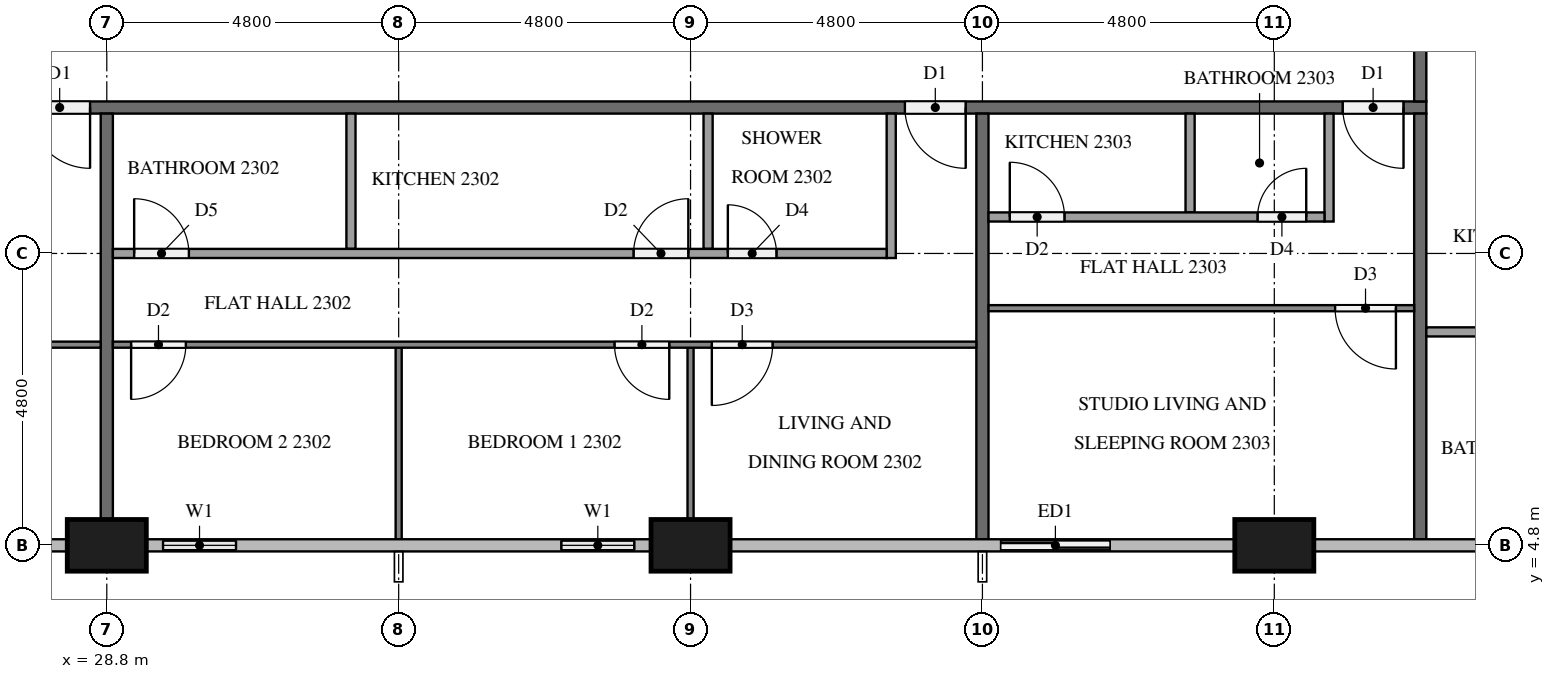
"""IFC4 building model, lengths in metres.
Left out: names, types, materials, properties, quantities, classifications, styles, units other than length and angle.
Written with IfcOpenShell. Run it as: python <this file> out.ifc"""

import sys

from ifc_helpers import new_model, si_unit, direction, frame, frame_2d, origin, origin_2d, place, context, subcontext, project, spatial, rectangle, extrude, element, fill, save


model = new_model("IFC4")
c1 = context("Model", 3, precision=1e-05, world=origin(), true_north=direction((0.0, 1.0)))
c2 = subcontext(c1, "Body", "Model", "MODEL_VIEW")
j1 = project(units=[si_unit("LENGTHUNIT", "METRE"), si_unit("PLANEANGLEUNIT", "RADIAN")], contexts=[c1])
p1 = place(None, origin())
s1 = spatial("IfcSite", under=j1, at=p1, CompositionType="ELEMENT")
p2 = place(p1, origin())
s2 = spatial("IfcBuilding", under=s1, at=p2, CompositionType="ELEMENT")
p3 = place(p2, frame((0.0, 0.0, 92.7)))
s3 = spatial("IfcBuildingStorey", under=s2, at=p3, CompositionType="ELEMENT", Elevation=92.7)
for number, where, z_axis, x_axis in (
    (1, (28.8, 4.8, 0.0), (0.0, 0.0, 1.0), (1.0, 0.0, 0.0)),
    (2, (38.4, 4.8, 0.0), (0.0, 0.0, 1.0), (1.0, 0.0, 0.0)),
    (3, (48.0, 4.8, 0.0), (0.0, 0.0, 1.0), (1.0, 0.0, 0.0)),
):
    element("IfcColumn", number, at=place(p3, frame(where, z_axis=z_axis, x_axis=x_axis)), inside=s3, PredefinedType="COLUMN", context=c2, shape_type="SweptSolid", body=[
        extrude(rectangle(XDim=1.3, YDim=0.85, at=origin_2d()), origin(), (0.0, 0.0, 1.0), 3.2),
    ])
p4 = place(p3, frame((26.4, 4.8, 0.0), z_axis=(0.0, 0.0, 1.0), x_axis=(1.0, 0.0, 0.0)))
e4 = element("IfcWall", 4, at=p4, inside=s3, PredefinedType="SOLIDWALL", context=c2, shape_type="SweptSolid", body=[
    extrude(rectangle(XDim=1.75, YDim=0.15, at=frame_2d((0.875, 0.0))), origin(), (0.0, 0.0, 1.0), 3.2),
])
p5 = place(p4, frame((0.275, 0.0, 0.9)))
e5 = element("IfcOpeningElement", 5, at=p5, cuts=e4, PredefinedType="OPENING", context=c2, shape_type="SweptSolid", body=[
    extrude(rectangle(XDim=1.2, YDim=1.4, at=frame_2d((0.6, 0.7))), frame((0.0, 0.085, 0.0), z_axis=(0.0, -1.0, 0.0), x_axis=(1.0, 0.0, 0.0)), (0.0, 0.0, 1.0), 0.17),
])
p6 = place(p3, frame((29.45, 4.8, 0.0), z_axis=(0.0, 0.0, 1.0), x_axis=(1.0, 0.0, 0.0)))
e6 = element("IfcWall", 6, at=p6, inside=s3, PredefinedType="SOLIDWALL", context=c2, shape_type="SweptSolid", body=[
    extrude(rectangle(XDim=1.75, YDim=0.15, at=frame_2d((0.875, 0.0))), origin(), (0.0, 0.0, 1.0), 3.2),
])
p7 = place(p6, frame((0.275, 0.0, 0.9)))
e7 = element("IfcOpeningElement", 7, at=p7, cuts=e6, PredefinedType="OPENING", context=c2, shape_type="SweptSolid", body=[
    extrude(rectangle(XDim=1.2, YDim=1.4, at=frame_2d((0.6, 0.7))), frame((0.0, 0.085, 0.0), z_axis=(0.0, -1.0, 0.0), x_axis=(1.0, 0.0, 0.0)), (0.0, 0.0, 1.0), 0.17),
])
p8 = place(p3, frame((36.0, 4.8, 0.0), z_axis=(0.0, 0.0, 1.0), x_axis=(1.0, 0.0, 0.0)))
e8 = element("IfcWall", 8, at=p8, inside=s3, PredefinedType="SOLIDWALL", context=c2, shape_type="SweptSolid", body=[
    extrude(rectangle(XDim=1.75, YDim=0.15, at=frame_2d((0.875, 0.0))), origin(), (0.0, 0.0, 1.0), 3.2),
])
p9 = place(p8, frame((0.275, 0.0, 0.9)))
e9 = element("IfcOpeningElement", 9, at=p9, cuts=e8, PredefinedType="OPENING", context=c2, shape_type="SweptSolid", body=[
    extrude(rectangle(XDim=1.2, YDim=1.4, at=frame_2d((0.6, 0.7))), frame((0.0, 0.085, 0.0), z_axis=(0.0, -1.0, 0.0), x_axis=(1.0, 0.0, 0.0)), (0.0, 0.0, 1.0), 0.17),
])
p10 = place(p3, frame((43.2, 4.8, 0.0), z_axis=(0.0, 0.0, 1.0), x_axis=(1.0, 0.0, 0.0)))
e10 = element("IfcWall", 10, at=p10, inside=s3, PredefinedType="SOLIDWALL", context=c2, shape_type="SweptSolid", body=[
    extrude(rectangle(XDim=2.4, YDim=0.15, at=frame_2d((1.2, 0.0))), origin(), (0.0, 0.0, 1.0), 3.2),
])
p11 = place(p10, frame((0.3, 0.0, 0.0)))
e11 = element("IfcOpeningElement", 11, at=p11, cuts=e10, PredefinedType="OPENING", context=c2, shape_type="SweptSolid", body=[
    extrude(rectangle(XDim=1.8, YDim=2.4, at=frame_2d((0.9, 1.2))), frame((0.0, 0.085, 0.0), z_axis=(0.0, -1.0, 0.0), x_axis=(1.0, 0.0, 0.0)), (0.0, 0.0, 1.0), 0.17),
])
p12 = place(p3, frame((50.5, 12.0, 0.0), z_axis=(0.0, 0.0, 1.0), x_axis=(-1.0, 0.0, 0.0)))
e12 = element("IfcWall", 12, at=p12, inside=s3, PredefinedType="PARTITIONING", context=c2, shape_type="SweptSolid", body=[
    extrude(rectangle(XDim=38.6, YDim=0.2, at=frame_2d((19.3, 0.0))), origin(), (0.0, 0.0, 1.0), 3.2),
])
p13 = place(p12, frame((21.975, 0.0, 0.0)))
e13 = element("IfcOpeningElement", 13, at=p13, cuts=e12, PredefinedType="OPENING", context=c2, shape_type="SweptSolid", body=[
    extrude(rectangle(XDim=1.0, YDim=2.1, at=frame_2d((0.5, 1.05))), frame((0.0, 0.11, 0.0), z_axis=(0.0, -1.0, 0.0), x_axis=(1.0, 0.0, 0.0)), (0.0, 0.0, 1.0), 0.22),
])
p14 = place(p12, frame((7.575, 0.0, 0.0)))
e14 = element("IfcOpeningElement", 14, at=p14, cuts=e12, PredefinedType="OPENING", context=c2, shape_type="SweptSolid", body=[
    extrude(rectangle(XDim=1.0, YDim=2.1, at=frame_2d((0.5, 1.05))), frame((0.0, 0.11, 0.0), z_axis=(0.0, -1.0, 0.0), x_axis=(1.0, 0.0, 0.0)), (0.0, 0.0, 1.0), 0.22),
])
p15 = place(p12, frame((0.375, 0.0, 0.0)))
e15 = element("IfcOpeningElement", 15, at=p15, cuts=e12, PredefinedType="OPENING", context=c2, shape_type="SweptSolid", body=[
    extrude(rectangle(XDim=1.0, YDim=2.1, at=frame_2d((0.5, 1.05))), frame((0.0, 0.11, 0.0), z_axis=(0.0, -1.0, 0.0), x_axis=(1.0, 0.0, 0.0)), (0.0, 0.0, 1.0), 0.22),
])
p16 = place(p3, frame((50.4, 14.9, 0.0), z_axis=(0.0, 0.0, 1.0), x_axis=(0.0, -1.0, 0.0)))
e16 = element("IfcWall", 16, at=p16, inside=s3, PredefinedType="PARTITIONING", context=c2, shape_type="SweptSolid", body=[
    extrude(rectangle(XDim=2.8, YDim=0.2, at=frame_2d((1.4, 0.0))), origin(), (0.0, 0.0, 1.0), 3.2),
])
p17 = place(p16, frame((0.175, 0.0, 0.0)))
e17 = element("IfcOpeningElement", 17, at=p17, cuts=e16, PredefinedType="OPENING", context=c2, shape_type="SweptSolid", body=[
    extrude(rectangle(XDim=1.0, YDim=2.1, at=frame_2d((0.5, 1.05))), frame((0.0, 0.11, 0.0), z_axis=(0.0, -1.0, 0.0), x_axis=(1.0, 0.0, 0.0)), (0.0, 0.0, 1.0), 0.22),
])
p18 = place(p3, frame((28.8, 11.9, 0.0), z_axis=(0.0, 0.0, 1.0), x_axis=(0.0, -1.0, 0.0)))
e18 = element("IfcWall", 18, at=p18, inside=s3, PredefinedType="PARTITIONING", context=c2, shape_type="SweptSolid", body=[
    extrude(rectangle(XDim=6.675, YDim=0.2, at=frame_2d((3.337, 0.0))), origin(), (0.0, 0.0, 1.0), 3.2),
])
for number, where, z_axis, x_axis in (
    (19, (43.2, 11.9, 0.0), (0.0, 0.0, 1.0), (0.0, -1.0, 0.0)),
    (20, (50.4, 11.9, 0.0), (0.0, 0.0, 1.0), (0.0, -1.0, 0.0)),
):
    element("IfcWall", number, at=place(p3, frame(where, z_axis=z_axis, x_axis=x_axis)), inside=s3, PredefinedType="PARTITIONING", context=c2, shape_type="SweptSolid", body=[
        extrude(rectangle(XDim=7.0, YDim=0.2, at=frame_2d((3.5, 0.0))), origin(), (0.0, 0.0, 1.0), 3.2),
    ])
p19 = place(p3, frame((28.7, 8.1, 0.0), z_axis=(0.0, 0.0, 1.0), x_axis=(-1.0, 0.0, 0.0)))
e21 = element("IfcWall", 21, at=p19, inside=s3, PredefinedType="PARTITIONING", context=c2, shape_type="SweptSolid", body=[
    extrude(rectangle(XDim=16.6, YDim=0.1, at=frame_2d((8.3, 0.0))), origin(), (0.0, 0.0, 1.0), 3.2),
])
p20 = place(p19, frame((3.45, 0.0, 0.0)))
e22 = element("IfcOpeningElement", 22, at=p20, cuts=e21, PredefinedType="OPENING", context=c2, shape_type="SweptSolid", body=[
    extrude(rectangle(XDim=0.9, YDim=2.1, at=frame_2d((0.45, 1.05))), frame((0.0, 0.06, 0.0), z_axis=(0.0, -1.0, 0.0), x_axis=(1.0, 0.0, 0.0)), (0.0, 0.0, 1.0), 0.12),
])
p21 = place(p19, frame((5.05, 0.0, 0.0)))
e23 = element("IfcOpeningElement", 23, at=p21, cuts=e21, PredefinedType="OPENING", context=c2, shape_type="SweptSolid", body=[
    extrude(rectangle(XDim=1.0, YDim=2.1, at=frame_2d((0.5, 1.05))), frame((0.0, 0.06, 0.0), z_axis=(0.0, -1.0, 0.0), x_axis=(1.0, 0.0, 0.0)), (0.0, 0.0, 1.0), 0.12),
])
p22 = place(p19, frame((15.4, 0.0, 0.0)))
e24 = element("IfcOpeningElement", 24, at=p22, cuts=e21, PredefinedType="OPENING", context=c2, shape_type="SweptSolid", body=[
    extrude(rectangle(XDim=0.9, YDim=2.1, at=frame_2d((0.45, 1.05))), frame((0.0, 0.06, 0.0), z_axis=(0.0, -1.0, 0.0), x_axis=(1.0, 0.0, 0.0)), (0.0, 0.0, 1.0), 0.12),
])
p23 = place(p3, frame((38.4, 8.05, 0.0), z_axis=(0.0, 0.0, 1.0), x_axis=(0.0, -1.0, 0.0)))
e25 = element("IfcWall", 25, at=p23, inside=s3, PredefinedType="PARTITIONING", context=c2, shape_type="SweptSolid", body=[
    extrude(rectangle(XDim=2.825, YDim=0.1, at=frame_2d((1.413, 0.0))), origin(), (0.0, 0.0, 1.0), 3.2),
])
p24 = place(p3, frame((33.6, 8.05, 0.0), z_axis=(0.0, 0.0, 1.0), x_axis=(0.0, -1.0, 0.0)))
e26 = element("IfcWall", 26, at=p24, inside=s3, PredefinedType="PARTITIONING", context=c2, shape_type="SweptSolid", body=[
    extrude(rectangle(XDim=3.15, YDim=0.1, at=frame_2d((1.575, 0.0))), origin(), (0.0, 0.0, 1.0), 3.2),
])
p25 = place(p3, frame((43.1, 8.1, 0.0), z_axis=(0.0, 0.0, 1.0), x_axis=(-1.0, 0.0, 0.0)))
e27 = element("IfcWall", 27, at=p25, inside=s3, PredefinedType="PARTITIONING", context=c2, shape_type="SweptSolid", body=[
    extrude(rectangle(XDim=14.2, YDim=0.1, at=frame_2d((7.1, 0.0))), origin(), (0.0, 0.0, 1.0), 3.2),
])
p26 = place(p25, frame((3.35, 0.0, 0.0)))
e28 = element("IfcOpeningElement", 28, at=p26, cuts=e27, PredefinedType="OPENING", context=c2, shape_type="SweptSolid", body=[
    extrude(rectangle(XDim=1.0, YDim=2.1, at=frame_2d((0.5, 1.05))), frame((0.0, 0.06, 0.0), z_axis=(0.0, -1.0, 0.0), x_axis=(1.0, 0.0, 0.0)), (0.0, 0.0, 1.0), 0.12),
])
p27 = place(p25, frame((5.05, 0.0, 0.0)))
e29 = element("IfcOpeningElement", 29, at=p27, cuts=e27, PredefinedType="OPENING", context=c2, shape_type="SweptSolid", body=[
    extrude(rectangle(XDim=0.9, YDim=2.1, at=frame_2d((0.45, 1.05))), frame((0.0, 0.06, 0.0), z_axis=(0.0, -1.0, 0.0), x_axis=(1.0, 0.0, 0.0)), (0.0, 0.0, 1.0), 0.12),
])
p28 = place(p25, frame((13.0, 0.0, 0.0)))
e30 = element("IfcOpeningElement", 30, at=p28, cuts=e27, PredefinedType="OPENING", context=c2, shape_type="SweptSolid", body=[
    extrude(rectangle(XDim=0.9, YDim=2.1, at=frame_2d((0.45, 1.05))), frame((0.0, 0.06, 0.0), z_axis=(0.0, -1.0, 0.0), x_axis=(1.0, 0.0, 0.0)), (0.0, 0.0, 1.0), 0.12),
])
for number, where, z_axis, x_axis in (
    (31, (38.688, 11.9, 0.0), (0.0, 0.0, 1.0), (0.0, -1.0, 0.0)),
    (32, (32.815, 11.9, 0.0), (0.0, 0.0, 1.0), (0.0, -1.0, 0.0)),
):
    element("IfcWall", number, at=place(p3, frame(where, z_axis=z_axis, x_axis=x_axis)), inside=s3, PredefinedType="PARTITIONING", context=c2, shape_type="SweptSolid", body=[
        extrude(rectangle(XDim=2.225, YDim=0.15, at=frame_2d((1.112, 0.0))), origin(), (0.0, 0.0, 1.0), 3.2),
    ])
p29 = place(p3, frame((41.7, 11.9, 0.0), z_axis=(0.0, 0.0, 1.0), x_axis=(0.0, -1.0, 0.0)))
e33 = element("IfcWall", 33, at=p29, inside=s3, PredefinedType="PARTITIONING", context=c2, shape_type="SweptSolid", body=[
    extrude(rectangle(XDim=2.375, YDim=0.15, at=frame_2d((1.188, 0.0))), origin(), (0.0, 0.0, 1.0), 3.2),
])
p30 = place(p3, frame((28.9, 9.6, 0.0), z_axis=(0.0, 0.0, 1.0), x_axis=(1.0, 0.0, 0.0)))
e34 = element("IfcWall", 34, at=p30, inside=s3, PredefinedType="PARTITIONING", context=c2, shape_type="SweptSolid", body=[
    extrude(rectangle(XDim=12.725, YDim=0.15, at=frame_2d((6.363, 0.0))), origin(), (0.0, 0.0, 1.0), 3.2),
])
p31 = place(p30, frame((10.114, 0.0, 0.0)))
e35 = element("IfcOpeningElement", 35, at=p31, cuts=e34, PredefinedType="OPENING", context=c2, shape_type="SweptSolid", body=[
    extrude(rectangle(XDim=0.8, YDim=2.1, at=frame_2d((0.4, 1.05))), frame((0.0, 0.085, 0.0), z_axis=(0.0, -1.0, 0.0), x_axis=(1.0, 0.0, 0.0)), (0.0, 0.0, 1.0), 0.17),
])
p32 = place(p30, frame((8.563, 0.0, 0.0)))
e36 = element("IfcOpeningElement", 36, at=p32, cuts=e34, PredefinedType="OPENING", context=c2, shape_type="SweptSolid", body=[
    extrude(rectangle(XDim=0.9, YDim=2.1, at=frame_2d((0.45, 1.05))), frame((0.0, 0.085, 0.0), z_axis=(0.0, -1.0, 0.0), x_axis=(1.0, 0.0, 0.0)), (0.0, 0.0, 1.0), 0.17),
])
p33 = place(p30, frame((0.35, 0.0, 0.0)))
e37 = element("IfcOpeningElement", 37, at=p33, cuts=e34, PredefinedType="OPENING", context=c2, shape_type="SweptSolid", body=[
    extrude(rectangle(XDim=0.9, YDim=2.1, at=frame_2d((0.45, 1.05))), frame((0.0, 0.085, 0.0), z_axis=(0.0, -1.0, 0.0), x_axis=(1.0, 0.0, 0.0)), (0.0, 0.0, 1.0), 0.17),
])
p34 = place(p3, frame((50.3, 8.7, 0.0), z_axis=(0.0, 0.0, 1.0), x_axis=(-1.0, 0.0, 0.0)))
e38 = element("IfcWall", 38, at=p34, inside=s3, PredefinedType="PARTITIONING", context=c2, shape_type="SweptSolid", body=[
    extrude(rectangle(XDim=7.0, YDim=0.1, at=frame_2d((3.5, 0.0))), origin(), (0.0, 0.0, 1.0), 3.2),
])
p35 = place(p34, frame((0.3, 0.0, 0.0)))
e39 = element("IfcOpeningElement", 39, at=p35, cuts=e38, PredefinedType="OPENING", context=c2, shape_type="SweptSolid", body=[
    extrude(rectangle(XDim=1.0, YDim=2.1, at=frame_2d((0.5, 1.05))), frame((0.0, 0.06, 0.0), z_axis=(0.0, -1.0, 0.0), x_axis=(1.0, 0.0, 0.0)), (0.0, 0.0, 1.0), 0.12),
])
p36 = place(p3, frame((46.615, 11.9, 0.0), z_axis=(0.0, 0.0, 1.0), x_axis=(0.0, -1.0, 0.0)))
e40 = element("IfcWall", 40, at=p36, inside=s3, PredefinedType="PARTITIONING", context=c2, shape_type="SweptSolid", body=[
    extrude(rectangle(XDim=1.625, YDim=0.15, at=frame_2d((0.812, 0.0))), origin(), (0.0, 0.0, 1.0), 3.2),
])
p37 = place(p3, frame((48.9, 11.9, 0.0), z_axis=(0.0, 0.0, 1.0), x_axis=(0.0, -1.0, 0.0)))
e41 = element("IfcWall", 41, at=p37, inside=s3, PredefinedType="PARTITIONING", context=c2, shape_type="SweptSolid", body=[
    extrude(rectangle(XDim=1.775, YDim=0.15, at=frame_2d((0.887, 0.0))), origin(), (0.0, 0.0, 1.0), 3.2),
])
p38 = place(p3, frame((43.3, 10.2, 0.0), z_axis=(0.0, 0.0, 1.0), x_axis=(1.0, 0.0, 0.0)))
e42 = element("IfcWall", 42, at=p38, inside=s3, PredefinedType="PARTITIONING", context=c2, shape_type="SweptSolid", body=[
    extrude(rectangle(XDim=5.525, YDim=0.15, at=frame_2d((2.762, 0.0))), origin(), (0.0, 0.0, 1.0), 3.2),
])
p39 = place(p38, frame((4.425, 0.0, 0.0)))
e43 = element("IfcOpeningElement", 43, at=p39, cuts=e42, PredefinedType="OPENING", context=c2, shape_type="SweptSolid", body=[
    extrude(rectangle(XDim=0.8, YDim=2.1, at=frame_2d((0.4, 1.05))), frame((0.0, 0.085, 0.0), z_axis=(0.0, -1.0, 0.0), x_axis=(1.0, 0.0, 0.0)), (0.0, 0.0, 1.0), 0.17),
])
p40 = place(p38, frame((0.35, 0.0, 0.0)))
e44 = element("IfcOpeningElement", 44, at=p40, cuts=e42, PredefinedType="OPENING", context=c2, shape_type="SweptSolid", body=[
    extrude(rectangle(XDim=0.9, YDim=2.1, at=frame_2d((0.45, 1.05))), frame((0.0, 0.085, 0.0), z_axis=(0.0, -1.0, 0.0), x_axis=(1.0, 0.0, 0.0)), (0.0, 0.0, 1.0), 0.17),
])
p41 = place(p3, frame((50.5, 8.31, 0.0), z_axis=(0.0, 0.0, 1.0), x_axis=(1.0, 0.0, 0.0)))
e45 = element("IfcWall", 45, at=p41, inside=s3, PredefinedType="PARTITIONING", context=c2, shape_type="SweptSolid", body=[
    extrude(rectangle(XDim=2.975, YDim=0.15, at=frame_2d((1.488, 0.0))), origin(), (0.0, 0.0, 1.0), 3.2),
])
p42 = place(p7, origin())
e46 = element("IfcWindow", 46, at=p42, inside=s3, PartitioningType="SINGLE_PANEL", PredefinedType="WINDOW", context=c2, shape_type="SweptSolid", body=[
    extrude(rectangle(XDim=1.2, YDim=1.4, at=frame_2d((0.6, 0.7))), frame((0.0, 0.03, 0.0), z_axis=(0.0, -1.0, 0.0), x_axis=(1.0, 0.0, 0.0)), (0.0, 0.0, 1.0), 0.06),
])
fill(e7, e46)
p43 = place(p9, origin())
e47 = element("IfcWindow", 47, at=p43, inside=s3, PartitioningType="SINGLE_PANEL", PredefinedType="WINDOW", context=c2, shape_type="SweptSolid", body=[
    extrude(rectangle(XDim=1.2, YDim=1.4, at=frame_2d((0.6, 0.7))), frame((0.0, 0.03, 0.0), z_axis=(0.0, -1.0, 0.0), x_axis=(1.0, 0.0, 0.0)), (0.0, 0.0, 1.0), 0.06),
])
fill(e9, e47)
p44 = place(p11, origin())
e48 = element("IfcDoor", 48, at=p44, inside=s3, OperationType="SLIDING_TO_LEFT", PredefinedType="DOOR", context=c2, shape_type="SweptSolid", body=[
    extrude(rectangle(XDim=1.8, YDim=2.4, at=frame_2d((0.9, 1.2))), frame((0.0, 0.025, 0.0), z_axis=(0.0, -1.0, 0.0), x_axis=(1.0, 0.0, 0.0)), (0.0, 0.0, 1.0), 0.05),
])
fill(e11, e48)
p45 = place(p13, origin())
e49 = element("IfcDoor", 49, at=p45, inside=s3, OperationType="SINGLE_SWING_LEFT", PredefinedType="DOOR", context=c2, shape_type="SweptSolid", body=[
    extrude(rectangle(XDim=1.0, YDim=2.1, at=frame_2d((0.5, 1.05))), frame((0.0, 0.025, 0.0), z_axis=(0.0, -1.0, 0.0), x_axis=(1.0, 0.0, 0.0)), (0.0, 0.0, 1.0), 0.05),
])
fill(e13, e49)
p46 = place(p14, origin())
e50 = element("IfcDoor", 50, at=p46, inside=s3, OperationType="SINGLE_SWING_LEFT", PredefinedType="DOOR", context=c2, shape_type="SweptSolid", body=[
    extrude(rectangle(XDim=1.0, YDim=2.1, at=frame_2d((0.5, 1.05))), frame((0.0, 0.025, 0.0), z_axis=(0.0, -1.0, 0.0), x_axis=(1.0, 0.0, 0.0)), (0.0, 0.0, 1.0), 0.05),
])
fill(e14, e50)
p47 = place(p15, origin())
e51 = element("IfcDoor", 51, at=p47, inside=s3, OperationType="SINGLE_SWING_LEFT", PredefinedType="DOOR", context=c2, shape_type="SweptSolid", body=[
    extrude(rectangle(XDim=1.0, YDim=2.1, at=frame_2d((0.5, 1.05))), frame((0.0, 0.025, 0.0), z_axis=(0.0, -1.0, 0.0), x_axis=(1.0, 0.0, 0.0)), (0.0, 0.0, 1.0), 0.05),
])
fill(e15, e51)
p48 = place(p26, origin())
e52 = element("IfcDoor", 52, at=p48, inside=s3, OperationType="SINGLE_SWING_RIGHT", PredefinedType="DOOR", context=c2, shape_type="SweptSolid", body=[
    extrude(rectangle(XDim=1.0, YDim=2.1, at=frame_2d((0.5, 1.05))), frame((0.0, 0.025, 0.0), z_axis=(0.0, -1.0, 0.0), x_axis=(1.0, 0.0, 0.0)), (0.0, 0.0, 1.0), 0.05),
])
fill(e28, e52)
p49 = place(p27, origin())
e53 = element("IfcDoor", 53, at=p49, inside=s3, OperationType="SINGLE_SWING_LEFT", PredefinedType="DOOR", context=c2, shape_type="SweptSolid", body=[
    extrude(rectangle(XDim=0.9, YDim=2.1, at=frame_2d((0.45, 1.05))), frame((0.0, 0.025, 0.0), z_axis=(0.0, -1.0, 0.0), x_axis=(1.0, 0.0, 0.0)), (0.0, 0.0, 1.0), 0.05),
])
fill(e29, e53)
p50 = place(p28, origin())
e54 = element("IfcDoor", 54, at=p50, inside=s3, OperationType="SINGLE_SWING_RIGHT", PredefinedType="DOOR", context=c2, shape_type="SweptSolid", body=[
    extrude(rectangle(XDim=0.9, YDim=2.1, at=frame_2d((0.45, 1.05))), frame((0.0, 0.025, 0.0), z_axis=(0.0, -1.0, 0.0), x_axis=(1.0, 0.0, 0.0)), (0.0, 0.0, 1.0), 0.05),
])
fill(e30, e54)
p51 = place(p31, origin())
e55 = element("IfcDoor", 55, at=p51, inside=s3, OperationType="SINGLE_SWING_LEFT", PredefinedType="DOOR", context=c2, shape_type="SweptSolid", body=[
    extrude(rectangle(XDim=0.8, YDim=2.1, at=frame_2d((0.4, 1.05))), frame((0.0, 0.025, 0.0), z_axis=(0.0, -1.0, 0.0), x_axis=(1.0, 0.0, 0.0)), (0.0, 0.0, 1.0), 0.05),
])
fill(e35, e55)
p52 = place(p32, origin())
e56 = element("IfcDoor", 56, at=p52, inside=s3, OperationType="SINGLE_SWING_RIGHT", PredefinedType="DOOR", context=c2, shape_type="SweptSolid", body=[
    extrude(rectangle(XDim=0.9, YDim=2.1, at=frame_2d((0.45, 1.05))), frame((0.0, 0.025, 0.0), z_axis=(0.0, -1.0, 0.0), x_axis=(1.0, 0.0, 0.0)), (0.0, 0.0, 1.0), 0.05),
])
fill(e36, e56)
p53 = place(p33, origin())
e57 = element("IfcDoor", 57, at=p53, inside=s3, OperationType="SINGLE_SWING_LEFT", PredefinedType="DOOR", context=c2, shape_type="SweptSolid", body=[
    extrude(rectangle(XDim=0.9, YDim=2.1, at=frame_2d((0.45, 1.05))), frame((0.0, 0.025, 0.0), z_axis=(0.0, -1.0, 0.0), x_axis=(1.0, 0.0, 0.0)), (0.0, 0.0, 1.0), 0.05),
])
fill(e37, e57)
p54 = place(p35, origin())
e58 = element("IfcDoor", 58, at=p54, inside=s3, OperationType="SINGLE_SWING_LEFT", PredefinedType="DOOR", context=c2, shape_type="SweptSolid", body=[
    extrude(rectangle(XDim=1.0, YDim=2.1, at=frame_2d((0.5, 1.05))), frame((0.0, 0.025, 0.0), z_axis=(0.0, -1.0, 0.0), x_axis=(1.0, 0.0, 0.0)), (0.0, 0.0, 1.0), 0.05),
])
fill(e39, e58)
p55 = place(p39, origin())
e59 = element("IfcDoor", 59, at=p55, inside=s3, OperationType="SINGLE_SWING_RIGHT", PredefinedType="DOOR", context=c2, shape_type="SweptSolid", body=[
    extrude(rectangle(XDim=0.8, YDim=2.1, at=frame_2d((0.4, 1.05))), frame((0.0, 0.025, 0.0), z_axis=(0.0, -1.0, 0.0), x_axis=(1.0, 0.0, 0.0)), (0.0, 0.0, 1.0), 0.05),
])
fill(e43, e59)
p56 = place(p40, origin())
e60 = element("IfcDoor", 60, at=p56, inside=s3, OperationType="SINGLE_SWING_LEFT", PredefinedType="DOOR", context=c2, shape_type="SweptSolid", body=[
    extrude(rectangle(XDim=0.9, YDim=2.1, at=frame_2d((0.45, 1.05))), frame((0.0, 0.025, 0.0), z_axis=(0.0, -1.0, 0.0), x_axis=(1.0, 0.0, 0.0)), (0.0, 0.0, 1.0), 0.05),
])
fill(e44, e60)
save(model, sys.argv[1])
